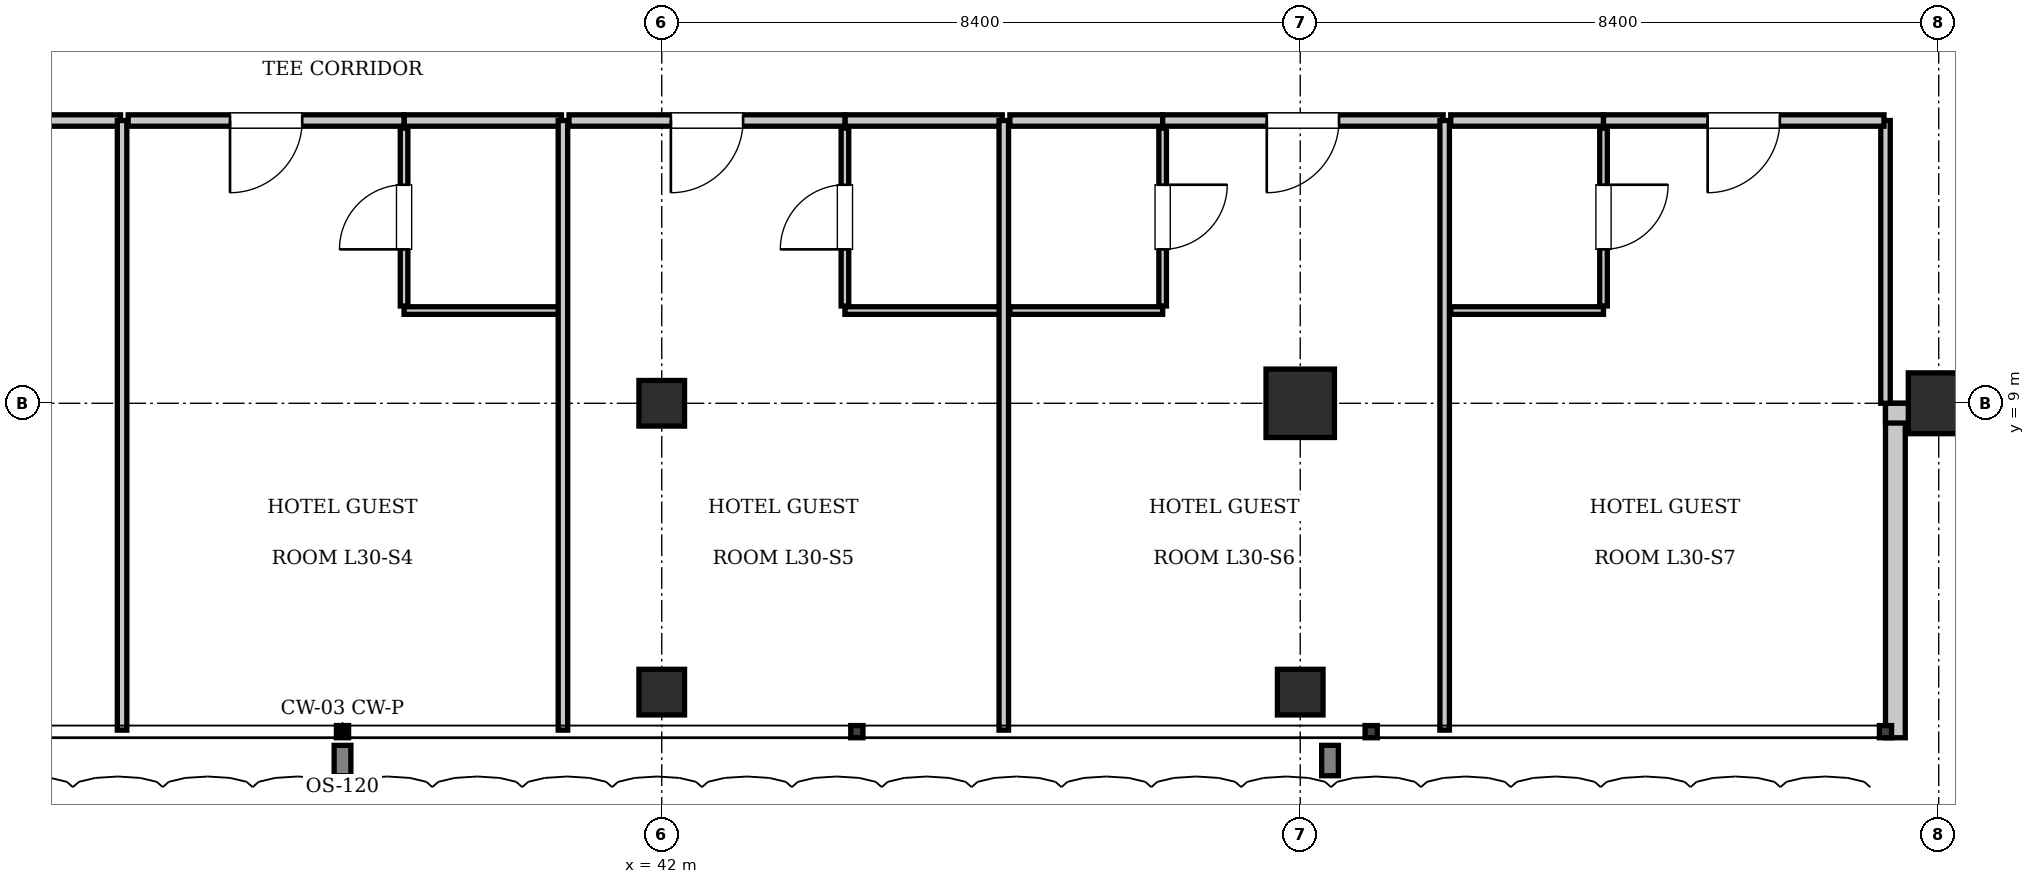
"""IFC4 building model, lengths in metres.
Left out: names, types, materials, properties, quantities, classifications, styles, units other than length and angle.
Written with IfcOpenShell. Run it as: python <this file> out.ifc"""

import sys

from ifc_helpers import new_model, si_unit, direction, frame, frame_2d, origin, origin_2d, place, context, subcontext, project, spatial, rectangle, i_section, extrude, element, fill, save


model = new_model("IFC4")
c1 = context("Model", 3, precision=1e-05, world=origin(), true_north=direction((0.0, 1.0)))
c2 = subcontext(c1, "Body", "Model", "MODEL_VIEW")
j1 = project(units=[si_unit("LENGTHUNIT", "METRE"), si_unit("PLANEANGLEUNIT", "RADIAN")], contexts=[c1])
p1 = place(None, origin())
s1 = spatial("IfcSite", under=j1, at=p1, CompositionType="ELEMENT")
p2 = place(p1, origin())
s2 = spatial("IfcBuilding", under=s1, at=p2, CompositionType="ELEMENT")
p3 = place(p2, frame((0.0, 0.0, 127.4)))
s3 = spatial("IfcBuildingStorey", under=s2, at=p3, CompositionType="ELEMENT", Elevation=127.4)
p4 = place(p3, frame((50.4, 9.0, 0.0), z_axis=(0.0, 0.0, 1.0), x_axis=(1.0, 0.0, 0.0)))
e1 = element("IfcColumn", 1, at=p4, inside=s3, PredefinedType="COLUMN", context=c2, shape_type="SweptSolid", body=[
    extrude(rectangle(XDim=0.9, YDim=0.9, at=origin_2d()), origin(), (0.0, 0.0, 1.0), 3.85),
])
p5 = place(p3, frame((42.0, 9.0, 0.0), z_axis=(0.0, 0.0, 1.0), x_axis=(1.0, 0.0, 0.0)))
e2 = element("IfcColumn", 2, at=p5, inside=s3, PredefinedType="COLUMN", context=c2, shape_type="SweptSolid", body=[
    extrude(i_section(OverallWidth=0.6, OverallDepth=0.6, WebThickness=0.025, FlangeThickness=0.038, at=origin_2d()), origin(), (0.0, 0.0, 1.0), 3.85),
])
p6 = place(p3, frame((58.8, 9.0, 0.0), z_axis=(0.0, 0.0, 1.0), x_axis=(1.0, 0.0, 0.0)))
e3 = element("IfcColumn", 3, at=p6, inside=s3, PredefinedType="COLUMN", context=c2, shape_type="SweptSolid", body=[
    extrude(rectangle(XDim=0.8, YDim=0.8, at=origin_2d()), origin(), (0.0, 0.0, 1.0), 3.85),
])
for number, where, z_axis, x_axis in (
    (4, (42.0, 5.2, 0.0), (0.0, 0.0, 1.0), (1.0, 0.0, 0.0)),
    (5, (50.4, 5.2, 0.0), (0.0, 0.0, 1.0), (1.0, 0.0, 0.0)),
):
    element("IfcColumn", number, at=place(p3, frame(where, z_axis=z_axis, x_axis=x_axis)), inside=s3, PredefinedType="COLUMN", context=c2, shape_type="SweptSolid", body=[
        extrude(i_section(OverallWidth=0.6, OverallDepth=0.6, WebThickness=0.025, FlangeThickness=0.038, at=origin_2d()), origin(), (0.0, 0.0, 1.0), 3.85),
    ])
p7 = place(p3, frame((58.23, 9.0, 0.0), z_axis=(0.0, 0.0, 1.0), x_axis=(0.0, -1.0, 0.0)))
e6 = element("IfcWall", 6, at=p7, inside=s3, PredefinedType="SOLIDWALL", context=c2, shape_type="SweptSolid", body=[
    extrude(rectangle(XDim=4.4, YDim=0.26, at=frame_2d((2.2, 0.0))), origin(), (0.0, 0.0, 1.0), 3.61),
])
p8 = place(p3, frame((62.5, 8.87, 0.0), z_axis=(0.0, 0.0, 1.0), x_axis=(-1.0, 0.0, 0.0)))
e7 = element("IfcWall", 7, at=p8, inside=s3, PredefinedType="SOLIDWALL", context=c2, shape_type="SweptSolid", body=[
    extrude(rectangle(XDim=4.4, YDim=0.26, at=frame_2d((2.2, 0.0))), origin(), (0.0, 0.0, 1.0), 2.998),
])
p9 = place(p3, frame((58.1, 9.0, 0.0), z_axis=(0.0, 0.0, 1.0), x_axis=(0.0, 1.0, 0.0)))
e8 = element("IfcWall", 8, at=p9, inside=s3, PredefinedType="PARTITIONING", context=c2, shape_type="SweptSolid", body=[
    extrude(rectangle(XDim=3.72, YDim=0.125, at=frame_2d((1.86, 0.0))), origin(), (0.0, 0.0, 1.0), 3.61),
])
p10 = place(p3, frame((31.19, 12.72, 0.0), z_axis=(0.0, 0.0, 1.0), x_axis=(1.0, 0.0, 0.0)))
e9 = element("IfcWall", 9, at=p10, inside=s3, PredefinedType="PARTITIONING", context=c2, shape_type="SweptSolid", body=[
    extrude(rectangle(XDim=3.69, YDim=0.15, at=frame_2d((1.845, 0.0))), origin(), (0.0, 0.0, 1.0), 3.61),
])
p11 = place(p10, frame((1.37, 0.0, 0.0)))
e10 = element("IfcOpeningElement", 10, at=p11, cuts=e9, PredefinedType="OPENING", context=c2, shape_type="SweptSolid", body=[
    extrude(rectangle(XDim=0.95, YDim=2.15, at=frame_2d((0.475, 1.075))), frame((0.0, 0.085, 0.0), z_axis=(0.0, -1.0, 0.0), x_axis=(1.0, 0.0, 0.0)), (0.0, 0.0, 1.0), 0.17),
])
p12 = place(p3, frame((34.9, 4.7, 0.0), z_axis=(0.0, 0.0, 1.0), x_axis=(0.0, 1.0, 0.0)))
e11 = element("IfcWall", 11, at=p12, inside=s3, PredefinedType="PARTITIONING", context=c2, shape_type="SweptSolid", body=[
    extrude(rectangle(XDim=8.02, YDim=0.125, at=frame_2d((4.01, 0.0))), origin(), (0.0, 0.0, 1.0), 3.61),
])
p13 = place(p3, frame((38.61, 12.72, 0.0), z_axis=(0.0, 0.0, 1.0), x_axis=(1.0, 0.0, 0.0)))
e12 = element("IfcWall", 12, at=p13, inside=s3, PredefinedType="PARTITIONING", context=c2, shape_type="SweptSolid", body=[
    extrude(rectangle(XDim=2.07, YDim=0.15, at=frame_2d((1.035, 0.0))), origin(), (0.0, 0.0, 1.0), 3.61),
])
p14 = place(p3, frame((38.61, 10.22, 0.0), z_axis=(0.0, 0.0, 1.0), x_axis=(1.0, 0.0, 0.0)))
e13 = element("IfcWall", 13, at=p14, inside=s3, PredefinedType="PARTITIONING", context=c2, shape_type="SweptSolid", body=[
    extrude(rectangle(XDim=2.05, YDim=0.1, at=frame_2d((1.025, 0.0))), origin(), (0.0, 0.0, 1.0), 3.61),
])
p15 = place(p3, frame((38.61, 10.28, 0.0), z_axis=(0.0, 0.0, 1.0), x_axis=(0.0, 1.0, 0.0)))
e14 = element("IfcWall", 14, at=p15, inside=s3, PredefinedType="PARTITIONING", context=c2, shape_type="SweptSolid", body=[
    extrude(rectangle(XDim=2.34, YDim=0.1, at=frame_2d((1.17, 0.0))), origin(), (0.0, 0.0, 1.0), 3.61),
])
p16 = place(p15, frame((0.745, 0.0, 0.0)))
e15 = element("IfcOpeningElement", 15, at=p16, cuts=e14, PredefinedType="OPENING", context=c2, shape_type="SweptSolid", body=[
    extrude(rectangle(XDim=0.85, YDim=2.1, at=frame_2d((0.425, 1.05))), frame((0.0, 0.06, 0.0), z_axis=(0.0, -1.0, 0.0), x_axis=(1.0, 0.0, 0.0)), (0.0, 0.0, 1.0), 0.12),
])
p17 = place(p3, frame((34.98, 12.72, 0.0), z_axis=(0.0, 0.0, 1.0), x_axis=(1.0, 0.0, 0.0)))
e16 = element("IfcWall", 16, at=p17, inside=s3, PredefinedType="PARTITIONING", context=c2, shape_type="SweptSolid", body=[
    extrude(rectangle(XDim=3.63, YDim=0.15, at=frame_2d((1.815, 0.0))), origin(), (0.0, 0.0, 1.0), 3.61),
])
p18 = place(p17, frame((1.34, 0.0, 0.0)))
e17 = element("IfcOpeningElement", 17, at=p18, cuts=e16, PredefinedType="OPENING", context=c2, shape_type="SweptSolid", body=[
    extrude(rectangle(XDim=0.95, YDim=2.15, at=frame_2d((0.475, 1.075))), frame((0.0, 0.085, 0.0), z_axis=(0.0, -1.0, 0.0), x_axis=(1.0, 0.0, 0.0)), (0.0, 0.0, 1.0), 0.17),
])
p19 = place(p3, frame((40.7, 4.7, 0.0), z_axis=(0.0, 0.0, 1.0), x_axis=(0.0, 1.0, 0.0)))
e18 = element("IfcWall", 18, at=p19, inside=s3, PredefinedType="PARTITIONING", context=c2, shape_type="SweptSolid", body=[
    extrude(rectangle(XDim=8.02, YDim=0.125, at=frame_2d((4.01, 0.0))), origin(), (0.0, 0.0, 1.0), 3.61),
])
p20 = place(p3, frame((44.41, 12.72, 0.0), z_axis=(0.0, 0.0, 1.0), x_axis=(1.0, 0.0, 0.0)))
e19 = element("IfcWall", 19, at=p20, inside=s3, PredefinedType="PARTITIONING", context=c2, shape_type="SweptSolid", body=[
    extrude(rectangle(XDim=2.07, YDim=0.15, at=frame_2d((1.035, 0.0))), origin(), (0.0, 0.0, 1.0), 3.61),
])
p21 = place(p3, frame((44.41, 10.22, 0.0), z_axis=(0.0, 0.0, 1.0), x_axis=(1.0, 0.0, 0.0)))
e20 = element("IfcWall", 20, at=p21, inside=s3, PredefinedType="PARTITIONING", context=c2, shape_type="SweptSolid", body=[
    extrude(rectangle(XDim=2.05, YDim=0.1, at=frame_2d((1.025, 0.0))), origin(), (0.0, 0.0, 1.0), 3.61),
])
p22 = place(p3, frame((44.41, 10.28, 0.0), z_axis=(0.0, 0.0, 1.0), x_axis=(0.0, 1.0, 0.0)))
e21 = element("IfcWall", 21, at=p22, inside=s3, PredefinedType="PARTITIONING", context=c2, shape_type="SweptSolid", body=[
    extrude(rectangle(XDim=2.34, YDim=0.1, at=frame_2d((1.17, 0.0))), origin(), (0.0, 0.0, 1.0), 3.61),
])
p23 = place(p22, frame((0.745, 0.0, 0.0)))
e22 = element("IfcOpeningElement", 22, at=p23, cuts=e21, PredefinedType="OPENING", context=c2, shape_type="SweptSolid", body=[
    extrude(rectangle(XDim=0.85, YDim=2.1, at=frame_2d((0.425, 1.05))), frame((0.0, 0.06, 0.0), z_axis=(0.0, -1.0, 0.0), x_axis=(1.0, 0.0, 0.0)), (0.0, 0.0, 1.0), 0.12),
])
p24 = place(p3, frame((40.78, 12.72, 0.0), z_axis=(0.0, 0.0, 1.0), x_axis=(1.0, 0.0, 0.0)))
e23 = element("IfcWall", 23, at=p24, inside=s3, PredefinedType="PARTITIONING", context=c2, shape_type="SweptSolid", body=[
    extrude(rectangle(XDim=3.63, YDim=0.15, at=frame_2d((1.815, 0.0))), origin(), (0.0, 0.0, 1.0), 3.61),
])
p25 = place(p24, frame((1.34, 0.0, 0.0)))
e24 = element("IfcOpeningElement", 24, at=p25, cuts=e23, PredefinedType="OPENING", context=c2, shape_type="SweptSolid", body=[
    extrude(rectangle(XDim=0.95, YDim=2.15, at=frame_2d((0.475, 1.075))), frame((0.0, 0.085, 0.0), z_axis=(0.0, -1.0, 0.0), x_axis=(1.0, 0.0, 0.0)), (0.0, 0.0, 1.0), 0.17),
])
p26 = place(p3, frame((46.5, 4.7, 0.0), z_axis=(0.0, 0.0, 1.0), x_axis=(0.0, 1.0, 0.0)))
e25 = element("IfcWall", 25, at=p26, inside=s3, PredefinedType="PARTITIONING", context=c2, shape_type="SweptSolid", body=[
    extrude(rectangle(XDim=8.02, YDim=0.125, at=frame_2d((4.01, 0.0))), origin(), (0.0, 0.0, 1.0), 3.61),
])
p27 = place(p3, frame((46.58, 12.72, 0.0), z_axis=(0.0, 0.0, 1.0), x_axis=(1.0, 0.0, 0.0)))
e26 = element("IfcWall", 26, at=p27, inside=s3, PredefinedType="PARTITIONING", context=c2, shape_type="SweptSolid", body=[
    extrude(rectangle(XDim=2.01, YDim=0.15, at=frame_2d((1.005, 0.0))), origin(), (0.0, 0.0, 1.0), 3.61),
])
p28 = place(p3, frame((46.58, 10.22, 0.0), z_axis=(0.0, 0.0, 1.0), x_axis=(1.0, 0.0, 0.0)))
e27 = element("IfcWall", 27, at=p28, inside=s3, PredefinedType="PARTITIONING", context=c2, shape_type="SweptSolid", body=[
    extrude(rectangle(XDim=2.01, YDim=0.1, at=frame_2d((1.005, 0.0))), origin(), (0.0, 0.0, 1.0), 3.61),
])
p29 = place(p3, frame((48.59, 10.28, 0.0), z_axis=(0.0, 0.0, 1.0), x_axis=(0.0, 1.0, 0.0)))
e28 = element("IfcWall", 28, at=p29, inside=s3, PredefinedType="PARTITIONING", context=c2, shape_type="SweptSolid", body=[
    extrude(rectangle(XDim=2.34, YDim=0.1, at=frame_2d((1.17, 0.0))), origin(), (0.0, 0.0, 1.0), 3.61),
])
p30 = place(p29, frame((0.745, 0.0, 0.0)))
e29 = element("IfcOpeningElement", 29, at=p30, cuts=e28, PredefinedType="OPENING", context=c2, shape_type="SweptSolid", body=[
    extrude(rectangle(XDim=0.85, YDim=2.1, at=frame_2d((0.425, 1.05))), frame((0.0, 0.06, 0.0), z_axis=(0.0, -1.0, 0.0), x_axis=(1.0, 0.0, 0.0)), (0.0, 0.0, 1.0), 0.12),
])
p31 = place(p3, frame((48.59, 12.72, 0.0), z_axis=(0.0, 0.0, 1.0), x_axis=(1.0, 0.0, 0.0)))
e30 = element("IfcWall", 30, at=p31, inside=s3, PredefinedType="PARTITIONING", context=c2, shape_type="SweptSolid", body=[
    extrude(rectangle(XDim=3.69, YDim=0.15, at=frame_2d((1.845, 0.0))), origin(), (0.0, 0.0, 1.0), 3.61),
])
p32 = place(p31, frame((1.37, 0.0, 0.0)))
e31 = element("IfcOpeningElement", 31, at=p32, cuts=e30, PredefinedType="OPENING", context=c2, shape_type="SweptSolid", body=[
    extrude(rectangle(XDim=0.95, YDim=2.15, at=frame_2d((0.475, 1.075))), frame((0.0, 0.085, 0.0), z_axis=(0.0, -1.0, 0.0), x_axis=(1.0, 0.0, 0.0)), (0.0, 0.0, 1.0), 0.17),
])
p33 = place(p3, frame((52.3, 4.7, 0.0), z_axis=(0.0, 0.0, 1.0), x_axis=(0.0, 1.0, 0.0)))
e32 = element("IfcWall", 32, at=p33, inside=s3, PredefinedType="PARTITIONING", context=c2, shape_type="SweptSolid", body=[
    extrude(rectangle(XDim=8.02, YDim=0.125, at=frame_2d((4.01, 0.0))), origin(), (0.0, 0.0, 1.0), 3.61),
])
p34 = place(p3, frame((52.38, 12.72, 0.0), z_axis=(0.0, 0.0, 1.0), x_axis=(1.0, 0.0, 0.0)))
e33 = element("IfcWall", 33, at=p34, inside=s3, PredefinedType="PARTITIONING", context=c2, shape_type="SweptSolid", body=[
    extrude(rectangle(XDim=2.01, YDim=0.15, at=frame_2d((1.005, 0.0))), origin(), (0.0, 0.0, 1.0), 3.61),
])
p35 = place(p3, frame((52.38, 10.22, 0.0), z_axis=(0.0, 0.0, 1.0), x_axis=(1.0, 0.0, 0.0)))
e34 = element("IfcWall", 34, at=p35, inside=s3, PredefinedType="PARTITIONING", context=c2, shape_type="SweptSolid", body=[
    extrude(rectangle(XDim=2.01, YDim=0.1, at=frame_2d((1.005, 0.0))), origin(), (0.0, 0.0, 1.0), 3.61),
])
p36 = place(p3, frame((54.39, 10.28, 0.0), z_axis=(0.0, 0.0, 1.0), x_axis=(0.0, 1.0, 0.0)))
e35 = element("IfcWall", 35, at=p36, inside=s3, PredefinedType="PARTITIONING", context=c2, shape_type="SweptSolid", body=[
    extrude(rectangle(XDim=2.34, YDim=0.1, at=frame_2d((1.17, 0.0))), origin(), (0.0, 0.0, 1.0), 3.61),
])
p37 = place(p36, frame((0.745, 0.0, 0.0)))
e36 = element("IfcOpeningElement", 36, at=p37, cuts=e35, PredefinedType="OPENING", context=c2, shape_type="SweptSolid", body=[
    extrude(rectangle(XDim=0.85, YDim=2.1, at=frame_2d((0.425, 1.05))), frame((0.0, 0.06, 0.0), z_axis=(0.0, -1.0, 0.0), x_axis=(1.0, 0.0, 0.0)), (0.0, 0.0, 1.0), 0.12),
])
p38 = place(p3, frame((54.39, 12.72, 0.0), z_axis=(0.0, 0.0, 1.0), x_axis=(1.0, 0.0, 0.0)))
e37 = element("IfcWall", 37, at=p38, inside=s3, PredefinedType="PARTITIONING", context=c2, shape_type="SweptSolid", body=[
    extrude(rectangle(XDim=3.69, YDim=0.15, at=frame_2d((1.845, 0.0))), origin(), (0.0, 0.0, 1.0), 3.61),
])
p39 = place(p38, frame((1.37, 0.0, 0.0)))
e38 = element("IfcOpeningElement", 38, at=p39, cuts=e37, PredefinedType="OPENING", context=c2, shape_type="SweptSolid", body=[
    extrude(rectangle(XDim=0.95, YDim=2.15, at=frame_2d((0.475, 1.075))), frame((0.0, 0.085, 0.0), z_axis=(0.0, -1.0, 0.0), x_axis=(1.0, 0.0, 0.0)), (0.0, 0.0, 1.0), 0.17),
])
p40 = place(p16, origin())
e39 = element("IfcDoor", 39, at=p40, inside=s3, OperationType="SINGLE_SWING_LEFT", PredefinedType="DOOR", context=c2, shape_type="SweptSolid", body=[
    extrude(rectangle(XDim=0.85, YDim=2.1, at=frame_2d((0.425, 1.05))), frame((0.0, 0.025, 0.0), z_axis=(0.0, -1.0, 0.0), x_axis=(1.0, 0.0, 0.0)), (0.0, 0.0, 1.0), 0.05),
])
fill(e15, e39)
p41 = place(p18, frame((0.95, 0.0, 0.0), z_axis=(0.0, 0.0, 1.0), x_axis=(-1.0, 0.0, 0.0)))
e40 = element("IfcDoor", 40, at=p41, inside=s3, OperationType="SINGLE_SWING_RIGHT", PredefinedType="DOOR", context=c2, shape_type="SweptSolid", body=[
    extrude(rectangle(XDim=0.95, YDim=2.15, at=frame_2d((0.475, 1.075))), frame((0.0, 0.025, 0.0), z_axis=(0.0, -1.0, 0.0), x_axis=(1.0, 0.0, 0.0)), (0.0, 0.0, 1.0), 0.05),
])
fill(e17, e40)
p42 = place(p23, origin())
e41 = element("IfcDoor", 41, at=p42, inside=s3, OperationType="SINGLE_SWING_LEFT", PredefinedType="DOOR", context=c2, shape_type="SweptSolid", body=[
    extrude(rectangle(XDim=0.85, YDim=2.1, at=frame_2d((0.425, 1.05))), frame((0.0, 0.025, 0.0), z_axis=(0.0, -1.0, 0.0), x_axis=(1.0, 0.0, 0.0)), (0.0, 0.0, 1.0), 0.05),
])
fill(e22, e41)
p43 = place(p25, frame((0.95, 0.0, 0.0), z_axis=(0.0, 0.0, 1.0), x_axis=(-1.0, 0.0, 0.0)))
e42 = element("IfcDoor", 42, at=p43, inside=s3, OperationType="SINGLE_SWING_RIGHT", PredefinedType="DOOR", context=c2, shape_type="SweptSolid", body=[
    extrude(rectangle(XDim=0.95, YDim=2.15, at=frame_2d((0.475, 1.075))), frame((0.0, 0.025, 0.0), z_axis=(0.0, -1.0, 0.0), x_axis=(1.0, 0.0, 0.0)), (0.0, 0.0, 1.0), 0.05),
])
fill(e24, e42)
p44 = place(p30, frame((0.85, 0.0, 0.0), z_axis=(0.0, 0.0, 1.0), x_axis=(-1.0, 0.0, 0.0)))
e43 = element("IfcDoor", 43, at=p44, inside=s3, OperationType="SINGLE_SWING_LEFT", PredefinedType="DOOR", context=c2, shape_type="SweptSolid", body=[
    extrude(rectangle(XDim=0.85, YDim=2.1, at=frame_2d((0.425, 1.05))), frame((0.0, 0.025, 0.0), z_axis=(0.0, -1.0, 0.0), x_axis=(1.0, 0.0, 0.0)), (0.0, 0.0, 1.0), 0.05),
])
fill(e29, e43)
p45 = place(p32, frame((0.95, 0.0, 0.0), z_axis=(0.0, 0.0, 1.0), x_axis=(-1.0, 0.0, 0.0)))
e44 = element("IfcDoor", 44, at=p45, inside=s3, OperationType="SINGLE_SWING_RIGHT", PredefinedType="DOOR", context=c2, shape_type="SweptSolid", body=[
    extrude(rectangle(XDim=0.95, YDim=2.15, at=frame_2d((0.475, 1.075))), frame((0.0, 0.025, 0.0), z_axis=(0.0, -1.0, 0.0), x_axis=(1.0, 0.0, 0.0)), (0.0, 0.0, 1.0), 0.05),
])
fill(e31, e44)
p46 = place(p37, frame((0.85, 0.0, 0.0), z_axis=(0.0, 0.0, 1.0), x_axis=(-1.0, 0.0, 0.0)))
e45 = element("IfcDoor", 45, at=p46, inside=s3, OperationType="SINGLE_SWING_LEFT", PredefinedType="DOOR", context=c2, shape_type="SweptSolid", body=[
    extrude(rectangle(XDim=0.85, YDim=2.1, at=frame_2d((0.425, 1.05))), frame((0.0, 0.025, 0.0), z_axis=(0.0, -1.0, 0.0), x_axis=(1.0, 0.0, 0.0)), (0.0, 0.0, 1.0), 0.05),
])
fill(e36, e45)
p47 = place(p39, frame((0.95, 0.0, 0.0), z_axis=(0.0, 0.0, 1.0), x_axis=(-1.0, 0.0, 0.0)))
e46 = element("IfcDoor", 46, at=p47, inside=s3, OperationType="SINGLE_SWING_RIGHT", PredefinedType="DOOR", context=c2, shape_type="SweptSolid", body=[
    extrude(rectangle(XDim=0.95, YDim=2.15, at=frame_2d((0.475, 1.075))), frame((0.0, 0.025, 0.0), z_axis=(0.0, -1.0, 0.0), x_axis=(1.0, 0.0, 0.0)), (0.0, 0.0, 1.0), 0.05),
])
fill(e38, e46)
save(model, sys.argv[1])
